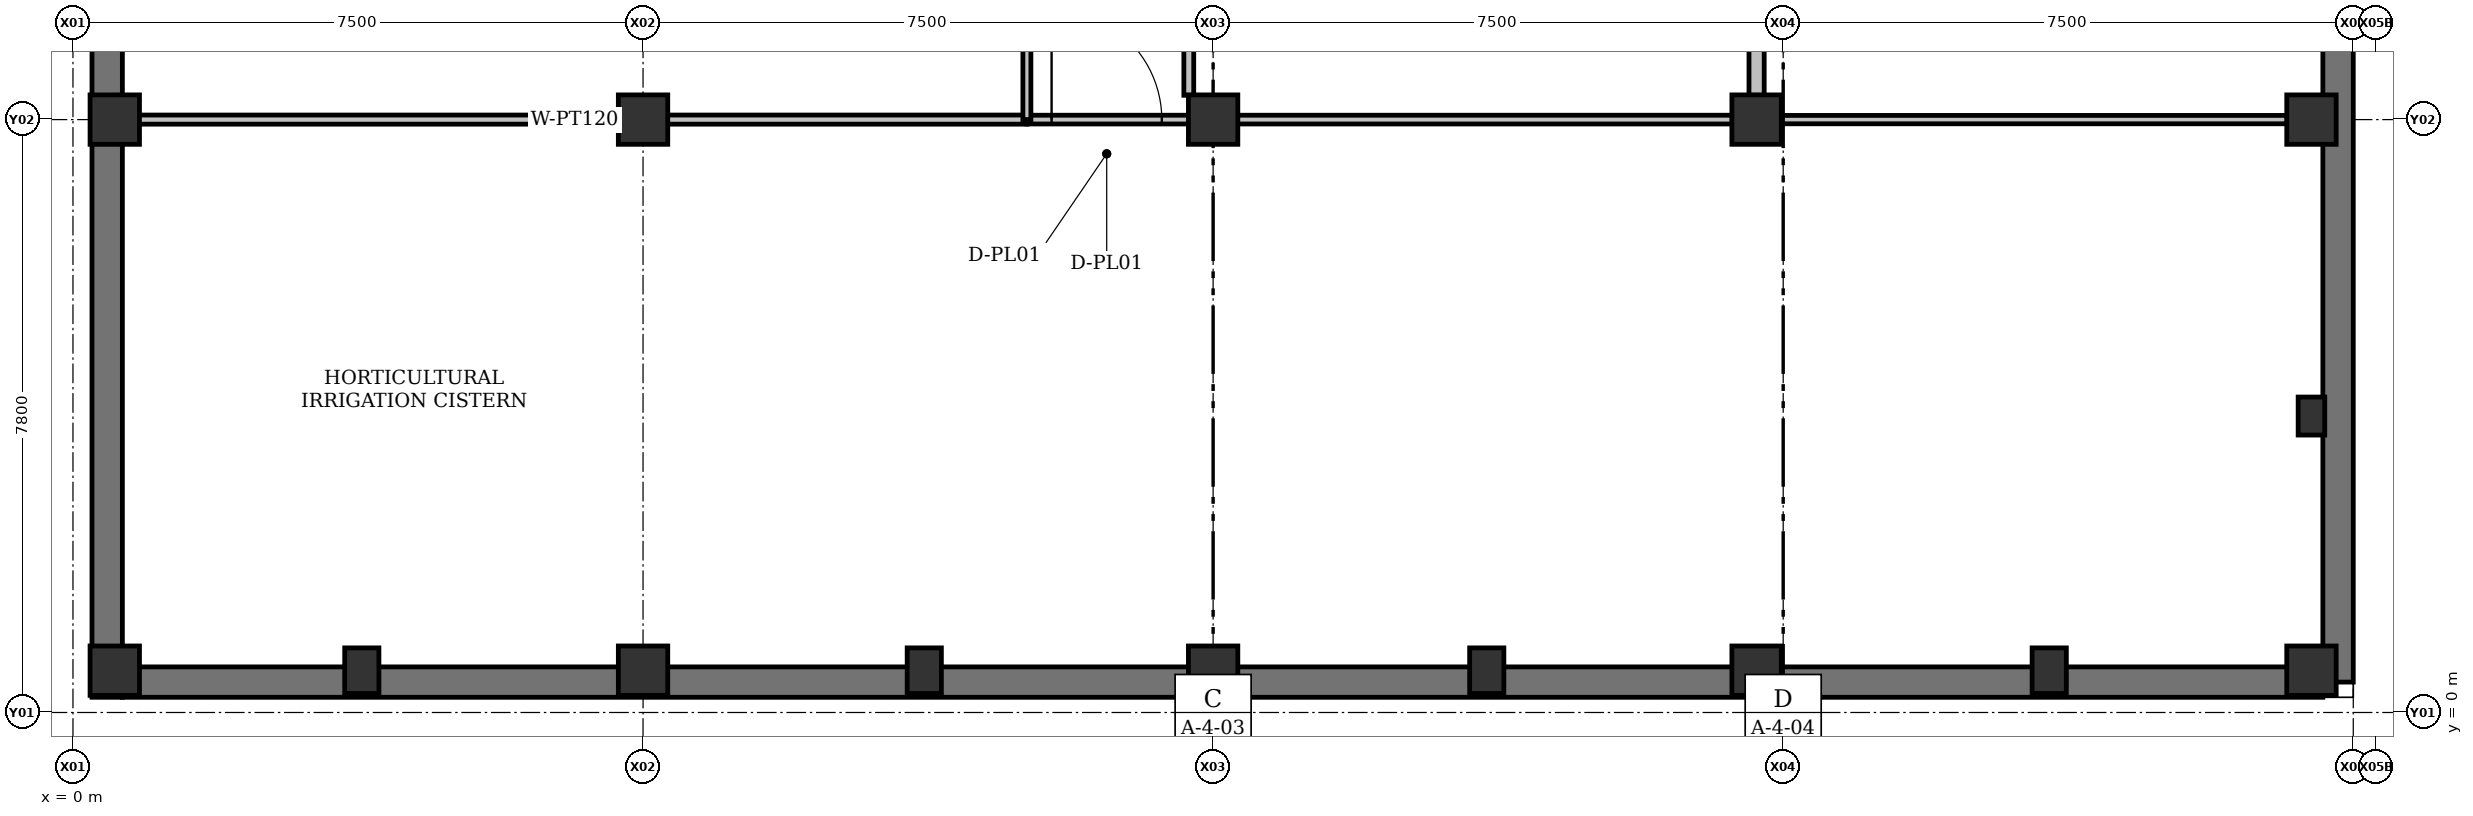
"""IFC4 building model, lengths in metres.
Left out: names, types, materials, properties, quantities, classifications, styles, units other than length and angle.
Written with IfcOpenShell. Run it as: python <this file> out.ifc"""

import sys

from ifc_helpers import new_model, si_unit, direction, frame, frame_2d, origin, origin_2d, place, context, subcontext, project, spatial, rectangle, extrude, element, fill, save


model = new_model("IFC4")
c1 = context("Model", 3, precision=1e-05, world=origin(), true_north=direction((0.0, 1.0)))
c2 = subcontext(c1, "Body", "Model", "MODEL_VIEW")
j1 = project(units=[si_unit("LENGTHUNIT", "METRE"), si_unit("PLANEANGLEUNIT", "RADIAN")], contexts=[c1])
p1 = place(None, origin())
s1 = spatial("IfcSite", under=j1, at=p1, CompositionType="ELEMENT")
p2 = place(p1, origin())
s2 = spatial("IfcBuilding", under=s1, at=p2, CompositionType="ELEMENT")
p3 = place(p2, frame((0.0, 0.0, -8.4)))
s3 = spatial("IfcBuildingStorey", under=s2, at=p3, CompositionType="ELEMENT", Elevation=-8.4)
for number, where, z_axis, x_axis in (
    (1, (0.55, 0.55, -0.3), (0.0, 0.0, 1.0), (1.0, 0.0, 0.0)),
    (2, (0.55, 7.8, -0.3), (0.0, 0.0, 1.0), (1.0, 0.0, 0.0)),
    (3, (7.5, 0.55, -0.3), (0.0, 0.0, 1.0), (1.0, 0.0, 0.0)),
    (4, (7.5, 7.8, -0.3), (0.0, 0.0, 1.0), (1.0, 0.0, 0.0)),
    (5, (15.0, 0.55, -0.3), (0.0, 0.0, 1.0), (1.0, 0.0, 0.0)),
    (6, (15.0, 7.8, -0.3), (0.0, 0.0, 1.0), (1.0, 0.0, 0.0)),
    (7, (22.15, 0.55, -0.3), (0.0, 0.0, 1.0), (1.0, 0.0, 0.0)),
    (8, (22.15, 7.8, -0.3), (0.0, 0.0, 1.0), (1.0, 0.0, 0.0)),
    (9, (29.45, 0.55, -0.3), (0.0, 0.0, 1.0), (1.0, 0.0, 0.0)),
    (10, (29.45, 7.8, -0.3), (0.0, 0.0, 1.0), (1.0, 0.0, 0.0)),
):
    element("IfcColumn", number, at=place(p3, frame(where, z_axis=z_axis, x_axis=x_axis)), inside=s3, PredefinedType="COLUMN", context=c2, shape_type="SweptSolid", body=[
        extrude(rectangle(XDim=0.65, YDim=0.65, at=origin_2d()), origin(), (0.0, 0.0, 1.0), 4.5),
    ])
for number, where, z_axis, x_axis in (
    (11, (3.8, 0.55, -0.3), (0.0, 0.0, 1.0), (1.0, 0.0, 0.0)),
    (12, (11.2, 0.55, -0.3), (0.0, 0.0, 1.0), (1.0, 0.0, 0.0)),
    (13, (18.6, 0.55, -0.3), (0.0, 0.0, 1.0), (1.0, 0.0, 0.0)),
    (14, (26.0, 0.55, -0.3), (0.0, 0.0, 1.0), (1.0, 0.0, 0.0)),
):
    element("IfcColumn", number, at=place(p3, frame(where, z_axis=z_axis, x_axis=x_axis)), inside=s3, PredefinedType="PILASTER", context=c2, shape_type="SweptSolid", body=[
        extrude(rectangle(XDim=0.45, YDim=0.6, at=origin_2d()), origin(), (0.0, 0.0, 1.0), 4.5),
    ])
p4 = place(p3, frame((29.45, 3.9, -0.3), z_axis=(0.0, 0.0, 1.0), x_axis=(1.0, 0.0, 0.0)))
e15 = element("IfcColumn", 15, at=p4, inside=s3, PredefinedType="PILASTER", context=c2, shape_type="SweptSolid", body=[
    extrude(rectangle(XDim=0.35, YDim=0.5, at=origin_2d()), origin(), (0.0, 0.0, 1.0), 4.5),
])
p5 = place(p3, frame((0.45, 0.2, -0.3), z_axis=(0.0, 0.0, 1.0), x_axis=(0.0, 1.0, 0.0)))
e16 = element("IfcWall", 16, at=p5, inside=s3, PredefinedType="USERDEFINED", context=c2, shape_type="SweptSolid", body=[
    extrude(rectangle(XDim=113.6, YDim=0.4, at=frame_2d((56.8, 0.0))), origin(), (0.0, 0.0, 1.0), 4.26),
])
p6 = place(p3, frame((29.8, 85.2, -0.3), z_axis=(0.0, 0.0, 1.0), x_axis=(0.0, -1.0, 0.0)))
e17 = element("IfcWall", 17, at=p6, inside=s3, PredefinedType="USERDEFINED", context=c2, shape_type="SweptSolid", body=[
    extrude(rectangle(XDim=84.8, YDim=0.4, at=frame_2d((42.4, 0.0))), origin(), (0.0, 0.0, 1.0), 4.26),
])
p7 = place(p3, frame((29.6, 0.4, -0.3), z_axis=(0.0, 0.0, 1.0), x_axis=(-1.0, 0.0, 0.0)))
e18 = element("IfcWall", 18, at=p7, inside=s3, PredefinedType="USERDEFINED", context=c2, shape_type="SweptSolid", body=[
    extrude(rectangle(XDim=28.95, YDim=0.4, at=frame_2d((14.475, 0.0))), origin(), (0.0, 0.0, 1.0), 4.26),
])
p8 = place(p3, frame((22.15, 8.12, 0.0), z_axis=(0.0, 0.0, 1.0), x_axis=(0.0, 1.0, 0.0)))
e19 = element("IfcWall", 19, at=p8, inside=s3, PredefinedType="SOLIDWALL", context=c2, shape_type="SweptSolid", body=[
    extrude(rectangle(XDim=17.56, YDim=0.2, at=frame_2d((8.78, 0.0))), origin(), (0.0, 0.0, 1.0), 3.487),
])
p9 = place(p3, frame((14.68, 8.12, 0.0), z_axis=(0.0, 0.0, 1.0), x_axis=(0.0, 1.0, 0.0)))
e20 = element("IfcWall", 20, at=p9, inside=s3, PredefinedType="PARTITIONING", context=c2, shape_type="SweptSolid", body=[
    extrude(rectangle(XDim=9.26, YDim=0.13, at=frame_2d((4.63, 0.0))), origin(), (0.0, 0.0, 1.0), 3.411),
])
p10 = place(p3, frame((0.65, 7.8, 0.0), z_axis=(0.0, 0.0, 1.0), x_axis=(1.0, 0.0, 0.0)))
e21 = element("IfcWall", 21, at=p10, inside=s3, PredefinedType="PARTITIONING", context=c2, shape_type="SweptSolid", body=[
    extrude(rectangle(XDim=11.9, YDim=0.12, at=frame_2d((5.95, 0.0))), origin(), (0.0, 0.0, 1.0), 3.411),
])
p11 = place(p3, frame((12.55, 7.8, 0.0), z_axis=(0.0, 0.0, 1.0), x_axis=(1.0, 0.0, 0.0)))
e22 = element("IfcWall", 22, at=p11, inside=s3, PredefinedType="PARTITIONING", context=c2, shape_type="SweptSolid", body=[
    extrude(rectangle(XDim=9.28, YDim=0.115, at=frame_2d((4.64, 0.0))), origin(), (0.0, 0.0, 1.0), 3.411),
])
p12 = place(p11, frame((0.325, 0.0, 0.0)))
e23 = element("IfcOpeningElement", 23, at=p12, cuts=e22, PredefinedType="OPENING", context=c2, shape_type="SweptSolid", body=[
    extrude(rectangle(XDim=1.45, YDim=2.2, at=frame_2d((0.725, 1.1))), frame((0.0, 0.058, 0.0), z_axis=(0.0, -1.0, 0.0), x_axis=(1.0, 0.0, 0.0)), (0.0, 0.0, 1.0), 0.115),
])
p13 = place(p3, frame((29.13, 7.8, 0.0), z_axis=(0.0, 0.0, 1.0), x_axis=(-1.0, 0.0, 0.0)))
e24 = element("IfcWall", 24, at=p13, inside=s3, PredefinedType="PARTITIONING", context=c2, shape_type="SweptSolid", body=[
    extrude(rectangle(XDim=6.66, YDim=0.11, at=frame_2d((3.33, 0.0))), origin(), (0.0, 0.0, 1.0), 3.411),
])
p14 = place(p3, frame((12.55, 51.78, 0.0), z_axis=(0.0, 0.0, 1.0), x_axis=(0.0, -1.0, 0.0)))
e25 = element("IfcWall", 25, at=p14, inside=s3, PredefinedType="PARTITIONING", context=c2, shape_type="SweptSolid", body=[
    extrude(rectangle(XDim=43.98, YDim=0.105, at=frame_2d((21.99, 0.0))), origin(), (0.0, 0.0, 1.0), 3.411),
])
p15 = place(p14, frame((21.18, 0.0, 0.0)))
e26 = element("IfcOpeningElement", 26, at=p15, cuts=e25, PredefinedType="OPENING", context=c2, shape_type="SweptSolid", body=[
    extrude(rectangle(XDim=1.6, YDim=2.25, at=frame_2d((0.8, 1.125))), frame((0.0, 0.052, 0.0), z_axis=(0.0, -1.0, 0.0), x_axis=(1.0, 0.0, 0.0)), (0.0, 0.0, 1.0), 0.105),
])
p16 = place(p12, origin())
e27 = element("IfcDoor", 27, at=p16, inside=s3, OperationType="SINGLE_SWING_LEFT", PredefinedType="DOOR", context=c2, shape_type="SweptSolid", body=[
    extrude(rectangle(XDim=1.45, YDim=2.2, at=frame_2d((0.725, 1.1))), frame((0.0, 0.025, 0.0), z_axis=(0.0, -1.0, 0.0), x_axis=(1.0, 0.0, 0.0)), (0.0, 0.0, 1.0), 0.05),
])
fill(e23, e27)
save(model, sys.argv[1])
